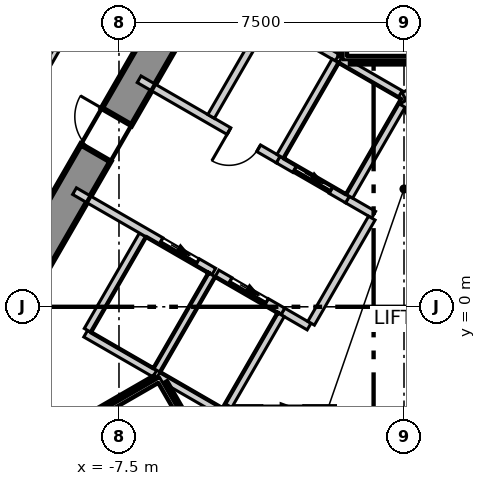
"""IFC4 building model, lengths in metres.
Left out: names, types, materials, properties, quantities, classifications, styles, units other than length and angle.
Written with IfcOpenShell. Run it as: python <this file> out.ifc"""

import sys

from ifc_helpers import new_model, si_unit, direction, frame, frame_2d, origin, place, context, subcontext, project, spatial, polyline, rectangle, outline, extrude, element, fill, save


model = new_model("IFC4")
c1 = context("Model", 3, precision=1e-05, world=origin(), true_north=direction((0.0, 1.0)))
c2 = subcontext(c1, "Body", "Model", "MODEL_VIEW")
j1 = project(units=[si_unit("LENGTHUNIT", "METRE"), si_unit("PLANEANGLEUNIT", "RADIAN")], contexts=[c1])
p1 = place(None, origin())
s1 = spatial("IfcSite", under=j1, at=p1, CompositionType="ELEMENT")
p2 = place(p1, origin())
s2 = spatial("IfcBuilding", under=s1, at=p2, CompositionType="ELEMENT")
p3 = place(p2, frame((0.0, 0.0, 35.3)))
s3 = spatial("IfcBuildingStorey", under=s2, at=p3, CompositionType="ELEMENT", Elevation=35.3)
p4 = place(p3, frame((-1.645, 15.25, -0.3), z_axis=(0.0, 0.0, 1.0), x_axis=(-0.500026485275, -0.866010111964, 0.0)))
e1 = element("IfcWall", 1, at=p4, inside=s3, PredefinedType="SHEAR", context=c2, shape_type="SweptSolid", body=[
    extrude(outline(polyline([(-0.26, -0.45), (1.685, -0.45), (3.63, -0.45), (5.576, -0.45), (7.521, -0.45), (9.466, -0.449), (11.411, -0.449), (13.357, -0.449), (15.302, -0.449), (17.247, -0.449), (19.192, -0.449), (21.138, -0.449), (23.083, -0.449), (25.028, -0.449), (24.509, 0.45), (22.644, 0.45), (20.778, 0.45), (18.913, 0.45), (17.048, 0.45), (15.182, 0.449), (13.317, 0.449), (11.452, 0.449), (9.587, 0.449), (7.721, 0.449), (5.856, 0.449), (3.991, 0.449), (2.125, 0.449), (0.26, 0.449), (-0.26, -0.45)])), origin(), (0.0, 0.0, 1.0), 4.0),
])
p5 = place(p4, frame((11.834, 0.0, 0.3)))
e2 = element("IfcOpeningElement", 2, at=p5, cuts=e1, PredefinedType="OPENING", context=c2, shape_type="SweptSolid", body=[
    extrude(rectangle(XDim=1.1, YDim=2.1, at=frame_2d((0.55, 1.05))), frame((0.0, 0.46, 0.0), z_axis=(0.0, -1.0, 0.0), x_axis=(1.0, 0.0, 0.0)), (0.0, 0.0, 1.0), 0.92),
])
p6 = place(p4, frame((4.842, 0.0, 0.3)))
e3 = element("IfcOpeningElement", 3, at=p6, cuts=e1, PredefinedType="OPENING", context=c2, shape_type="SweptSolid", body=[
    extrude(rectangle(XDim=1.0, YDim=2.1, at=frame_2d((0.5, 1.05))), frame((0.0, 0.46, 0.0), z_axis=(0.0, -1.0, 0.0), x_axis=(1.0, 0.0, 0.0)), (0.0, 0.0, 1.0), 0.92),
])
p7 = place(p3, frame((-3.462, 38.603, 0.0), z_axis=(0.0, 0.0, 1.0), x_axis=(-0.500012207976, -0.866018355391, 0.0)))
e4 = element("IfcWall", 4, at=p7, inside=s3, PredefinedType="ELEMENTEDWALL", context=c2, shape_type="SweptSolid", body=[
    extrude(rectangle(XDim=63.381, YDim=0.2, at=frame_2d((31.69, 0.0))), origin(), (0.0, 0.0, 1.0), 3.7),
])
p8 = place(p7, frame((2.302, 0.0, 0.9)))
e5 = element("IfcOpeningElement", 5, at=p8, cuts=e4, PredefinedType="OPENING", context=c2, shape_type="SweptSolid", body=[
    extrude(rectangle(XDim=5.6, YDim=2.5, at=frame_2d((2.8, 1.25))), frame((0.0, 0.11, 0.0), z_axis=(0.0, -1.0, 0.0), x_axis=(1.0, 0.0, 0.0)), (0.0, 0.0, 1.0), 0.22),
])
p9 = place(p7, frame((9.902, 0.0, 0.9)))
e6 = element("IfcOpeningElement", 6, at=p9, cuts=e4, PredefinedType="OPENING", context=c2, shape_type="SweptSolid", body=[
    extrude(rectangle(XDim=5.6, YDim=2.5, at=frame_2d((2.8, 1.25))), frame((0.0, 0.11, 0.0), z_axis=(0.0, -1.0, 0.0), x_axis=(1.0, 0.0, 0.0)), (0.0, 0.0, 1.0), 0.22),
])
p10 = place(p7, frame((17.501, 0.0, 0.9)))
e7 = element("IfcOpeningElement", 7, at=p10, cuts=e4, PredefinedType="OPENING", context=c2, shape_type="SweptSolid", body=[
    extrude(rectangle(XDim=5.6, YDim=2.5, at=frame_2d((2.8, 1.25))), frame((0.0, 0.11, 0.0), z_axis=(0.0, -1.0, 0.0), x_axis=(1.0, 0.0, 0.0)), (0.0, 0.0, 1.0), 0.22),
])
p11 = place(p7, frame((25.1, 0.0, 0.9)))
e8 = element("IfcOpeningElement", 8, at=p11, cuts=e4, PredefinedType="OPENING", context=c2, shape_type="SweptSolid", body=[
    extrude(rectangle(XDim=5.6, YDim=2.5, at=frame_2d((2.8, 1.25))), frame((0.0, 0.11, 0.0), z_axis=(0.0, -1.0, 0.0), x_axis=(1.0, 0.0, 0.0)), (0.0, 0.0, 1.0), 0.22),
])
p12 = place(p7, frame((32.7, 0.0, 0.9)))
e9 = element("IfcOpeningElement", 9, at=p12, cuts=e4, PredefinedType="OPENING", context=c2, shape_type="SweptSolid", body=[
    extrude(rectangle(XDim=5.6, YDim=2.5, at=frame_2d((2.8, 1.25))), frame((0.0, 0.11, 0.0), z_axis=(0.0, -1.0, 0.0), x_axis=(1.0, 0.0, 0.0)), (0.0, 0.0, 1.0), 0.22),
])
p13 = place(p7, frame((40.299, 0.0, 0.9)))
e10 = element("IfcOpeningElement", 10, at=p13, cuts=e4, PredefinedType="OPENING", context=c2, shape_type="SweptSolid", body=[
    extrude(rectangle(XDim=5.6, YDim=2.5, at=frame_2d((2.8, 1.25))), frame((0.0, 0.11, 0.0), z_axis=(0.0, -1.0, 0.0), x_axis=(1.0, 0.0, 0.0)), (0.0, 0.0, 1.0), 0.22),
])
p14 = place(p7, frame((47.899, 0.0, 0.9)))
e11 = element("IfcOpeningElement", 11, at=p14, cuts=e4, PredefinedType="OPENING", context=c2, shape_type="SweptSolid", body=[
    extrude(rectangle(XDim=5.6, YDim=2.5, at=frame_2d((2.8, 1.25))), frame((0.0, 0.11, 0.0), z_axis=(0.0, -1.0, 0.0), x_axis=(1.0, 0.0, 0.0)), (0.0, 0.0, 1.0), 0.22),
])
p15 = place(p7, frame((55.498, 0.0, 0.9)))
e12 = element("IfcOpeningElement", 12, at=p15, cuts=e4, PredefinedType="OPENING", context=c2, shape_type="SweptSolid", body=[
    extrude(rectangle(XDim=5.6, YDim=2.5, at=frame_2d((2.8, 1.25))), frame((0.0, 0.11, 0.0), z_axis=(0.0, -1.0, 0.0), x_axis=(1.0, 0.0, 0.0)), (0.0, 0.0, 1.0), 0.22),
])
p16 = place(p3, frame((-19.497, -11.17, 0.0), z_axis=(0.0, 0.0, 1.0), x_axis=(0.499998854553, 0.866026065108, 0.0)))
e13 = element("IfcWall", 13, at=p16, inside=s3, PredefinedType="PARTITIONING", context=c2, shape_type="SweptSolid", body=[
    extrude(rectangle(XDim=38.994, YDim=0.15, at=frame_2d((19.497, 0.0))), origin(), (0.0, 0.0, 1.0), 3.7),
])
p17 = place(p16, frame((36.244, 0.0, 0.0)))
e14 = element("IfcOpeningElement", 14, at=p17, cuts=e13, PredefinedType="OPENING", context=c2, shape_type="SweptSolid", body=[
    extrude(rectangle(XDim=1.1, YDim=2.1, at=frame_2d((0.55, 1.05))), frame((0.0, 0.085, 0.0), z_axis=(0.0, -1.0, 0.0), x_axis=(1.0, 0.0, 0.0)), (0.0, 0.0, 1.0), 0.17),
])
p18 = place(p16, frame((29.171, 0.0, 0.0)))
e15 = element("IfcOpeningElement", 15, at=p18, cuts=e13, PredefinedType="OPENING", context=c2, shape_type="SweptSolid", body=[
    extrude(rectangle(XDim=1.0, YDim=2.1, at=frame_2d((0.5, 1.05))), frame((0.0, 0.085, 0.0), z_axis=(0.0, -1.0, 0.0), x_axis=(1.0, 0.0, 0.0)), (0.0, 0.0, 1.0), 0.17),
])
p19 = place(p16, frame((32.971, 0.0, 0.0)))
e16 = element("IfcOpeningElement", 16, at=p19, cuts=e13, PredefinedType="OPENING", context=c2, shape_type="SweptSolid", body=[
    extrude(rectangle(XDim=0.9, YDim=2.1, at=frame_2d((0.45, 1.05))), frame((0.0, 0.085, 0.0), z_axis=(0.0, -1.0, 0.0), x_axis=(1.0, 0.0, 0.0)), (0.0, 0.0, 1.0), 0.17),
])
p20 = place(p16, frame((22.771, 0.0, 0.0)))
e17 = element("IfcOpeningElement", 17, at=p20, cuts=e13, PredefinedType="OPENING", context=c2, shape_type="SweptSolid", body=[
    extrude(rectangle(XDim=1.0, YDim=2.1, at=frame_2d((0.5, 1.05))), frame((0.0, 0.085, 0.0), z_axis=(0.0, -1.0, 0.0), x_axis=(1.0, 0.0, 0.0)), (0.0, 0.0, 1.0), 0.17),
])
p21 = place(p16, frame((6.872, 0.0, 0.0)))
e18 = element("IfcOpeningElement", 18, at=p21, cuts=e13, PredefinedType="OPENING", context=c2, shape_type="SweptSolid", body=[
    extrude(rectangle(XDim=1.1, YDim=2.1, at=frame_2d((0.55, 1.05))), frame((0.0, 0.085, 0.0), z_axis=(0.0, -1.0, 0.0), x_axis=(1.0, 0.0, 0.0)), (0.0, 0.0, 1.0), 0.17),
])
p22 = place(p16, frame((17.372, 0.0, 0.0)))
e19 = element("IfcOpeningElement", 19, at=p22, cuts=e13, PredefinedType="OPENING", context=c2, shape_type="SweptSolid", body=[
    extrude(rectangle(XDim=0.9, YDim=2.1, at=frame_2d((0.45, 1.05))), frame((0.0, 0.085, 0.0), z_axis=(0.0, -1.0, 0.0), x_axis=(1.0, 0.0, 0.0)), (0.0, 0.0, 1.0), 0.17),
])
p23 = place(p16, frame((14.172, 0.0, 0.0)))
e20 = element("IfcOpeningElement", 20, at=p23, cuts=e13, PredefinedType="OPENING", context=c2, shape_type="SweptSolid", body=[
    extrude(rectangle(XDim=0.9, YDim=2.1, at=frame_2d((0.45, 1.05))), frame((0.0, 0.085, 0.0), z_axis=(0.0, -1.0, 0.0), x_axis=(1.0, 0.0, 0.0)), (0.0, 0.0, 1.0), 0.17),
])
p24 = place(p16, frame((11.272, 0.0, 0.0)))
e21 = element("IfcOpeningElement", 21, at=p24, cuts=e13, PredefinedType="OPENING", context=c2, shape_type="SweptSolid", body=[
    extrude(rectangle(XDim=1.0, YDim=2.1, at=frame_2d((0.5, 1.05))), frame((0.0, 0.085, 0.0), z_axis=(0.0, -1.0, 0.0), x_axis=(1.0, 0.0, 0.0)), (0.0, 0.0, 1.0), 0.17),
])
p25 = place(p16, frame((1.473, 0.0, 0.0)))
e22 = element("IfcOpeningElement", 22, at=p25, cuts=e13, PredefinedType="OPENING", context=c2, shape_type="SweptSolid", body=[
    extrude(rectangle(XDim=1.1, YDim=2.1, at=frame_2d((0.55, 1.05))), frame((0.0, 0.085, 0.0), z_axis=(0.0, -1.0, 0.0), x_axis=(1.0, 0.0, 0.0)), (0.0, 0.0, 1.0), 0.17),
])
p26 = place(p3, frame((0.075, 22.47, 0.0), z_axis=(0.0, 0.0, 1.0), x_axis=(0.500002280369, -0.866024087209, 0.0)))
e23 = element("IfcWall", 23, at=p26, inside=s3, PredefinedType="PARTITIONING", context=c2, shape_type="SweptSolid", body=[
    extrude(rectangle(XDim=38.844, YDim=0.15, at=frame_2d((19.422, 0.0))), origin(), (0.0, 0.0, 1.0), 3.7),
])
p27 = place(p26, frame((36.244, 0.0, 0.0)))
e24 = element("IfcOpeningElement", 24, at=p27, cuts=e23, PredefinedType="OPENING", context=c2, shape_type="SweptSolid", body=[
    extrude(rectangle(XDim=1.1, YDim=2.1, at=frame_2d((0.55, 1.05))), frame((0.0, 0.085, 0.0), z_axis=(0.0, -1.0, 0.0), x_axis=(1.0, 0.0, 0.0)), (0.0, 0.0, 1.0), 0.17),
])
p28 = place(p26, frame((26.472, 0.0, 0.0)))
e25 = element("IfcOpeningElement", 25, at=p28, cuts=e23, PredefinedType="OPENING", context=c2, shape_type="SweptSolid", body=[
    extrude(rectangle(XDim=1.1, YDim=2.1, at=frame_2d((0.55, 1.05))), frame((0.0, 0.085, 0.0), z_axis=(0.0, -1.0, 0.0), x_axis=(1.0, 0.0, 0.0)), (0.0, 0.0, 1.0), 0.17),
])
p29 = place(p26, frame((8.872, 0.0, 0.0)))
e26 = element("IfcOpeningElement", 26, at=p29, cuts=e23, PredefinedType="OPENING", context=c2, shape_type="SweptSolid", body=[
    extrude(rectangle(XDim=1.1, YDim=2.1, at=frame_2d((0.55, 1.05))), frame((0.0, 0.085, 0.0), z_axis=(0.0, -1.0, 0.0), x_axis=(1.0, 0.0, 0.0)), (0.0, 0.0, 1.0), 0.17),
])
p30 = place(p26, frame((17.672, 0.0, 0.0)))
e27 = element("IfcOpeningElement", 27, at=p30, cuts=e23, PredefinedType="OPENING", context=c2, shape_type="SweptSolid", body=[
    extrude(rectangle(XDim=0.9, YDim=2.1, at=frame_2d((0.45, 1.05))), frame((0.0, 0.085, 0.0), z_axis=(0.0, -1.0, 0.0), x_axis=(1.0, 0.0, 0.0)), (0.0, 0.0, 1.0), 0.17),
])
p31 = place(p26, frame((15.272, 0.0, 0.0)))
e28 = element("IfcOpeningElement", 28, at=p31, cuts=e23, PredefinedType="OPENING", context=c2, shape_type="SweptSolid", body=[
    extrude(rectangle(XDim=0.9, YDim=2.1, at=frame_2d((0.45, 1.05))), frame((0.0, 0.085, 0.0), z_axis=(0.0, -1.0, 0.0), x_axis=(1.0, 0.0, 0.0)), (0.0, 0.0, 1.0), 0.17),
])
p32 = place(p26, frame((1.473, 0.0, 0.0)))
e29 = element("IfcOpeningElement", 29, at=p32, cuts=e23, PredefinedType="OPENING", context=c2, shape_type="SweptSolid", body=[
    extrude(rectangle(XDim=1.1, YDim=2.1, at=frame_2d((0.55, 1.05))), frame((0.0, 0.085, 0.0), z_axis=(0.0, -1.0, 0.0), x_axis=(1.0, 0.0, 0.0)), (0.0, 0.0, 1.0), 0.17),
])
p33 = place(p3, frame((-8.376, -0.707, 0.0), z_axis=(0.0, 0.0, 1.0), x_axis=(0.866067520717, -0.499927044236, 0.0)))
e30 = element("IfcWall", 30, at=p33, inside=s3, PredefinedType="SOLIDWALL", context=c2, shape_type="SweptSolid", body=[
    extrude(rectangle(XDim=2.1, YDim=0.2, at=frame_2d((1.05, 0.0))), origin(), (0.0, 0.0, 1.0), 3.7),
])
p34 = place(p3, frame((-8.326, -0.62, 0.0), z_axis=(0.0, 0.0, 1.0), x_axis=(0.500023687443, 0.866011727401, 0.0)))
e31 = element("IfcWall", 31, at=p34, inside=s3, PredefinedType="SOLIDWALL", context=c2, shape_type="SweptSolid", body=[
    extrude(rectangle(XDim=2.9, YDim=0.2, at=frame_2d((1.45, 0.0))), origin(), (0.0, 0.0, 1.0), 3.7),
])
p35 = place(p3, frame((-4.676, -2.7, 0.0), z_axis=(0.0, 0.0, 1.0), x_axis=(1.0, 0.0, 0.0)))
e32 = element("IfcWall", 32, at=p35, inside=s3, PredefinedType="SOLIDWALL", context=c2, shape_type="SweptSolid", body=[
    extrude(rectangle(XDim=2.873, YDim=0.2, at=frame_2d((1.437, 0.0))), origin(), (0.0, 0.0, 1.0), 3.7),
])
p36 = place(p35, frame((0.937, 0.0, 0.0)))
e33 = element("IfcOpeningElement", 33, at=p36, cuts=e32, PredefinedType="OPENING", context=c2, shape_type="SweptSolid", body=[
    extrude(rectangle(XDim=1.1, YDim=2.1, at=frame_2d((0.55, 1.05))), frame((0.0, 0.11, 0.0), z_axis=(0.0, -1.0, 0.0), x_axis=(1.0, 0.0, 0.0)), (0.0, 0.0, 1.0), 0.22),
])
p37 = place(p3, frame((-0.002, 5.541, 0.0), z_axis=(0.0, 0.0, 1.0), x_axis=(0.86600155993, 0.500041296494, 0.0)))
e34 = element("IfcWall", 34, at=p37, inside=s3, PredefinedType="SOLIDWALL", context=c2, shape_type="SweptSolid", body=[
    extrude(rectangle(XDim=4.132, YDim=0.2, at=frame_2d((2.066, 0.0))), origin(), (0.0, 0.0, 1.0), 3.7),
])
p38 = place(p3, frame((0.0, 5.4, 0.0), z_axis=(0.0, 0.0, 1.0), x_axis=(0.500103862429, -0.865965430478, 0.0)))
e35 = element("IfcWall", 35, at=p38, inside=s3, PredefinedType="SOLIDWALL", context=c2, shape_type="SweptSolid", body=[
    extrude(rectangle(XDim=2.973, YDim=0.2, at=frame_2d((1.487, 0.0))), origin(), (0.0, 0.0, 1.0), 3.7),
])
p39 = place(p38, frame((0.937, 0.0, 0.0)))
e36 = element("IfcOpeningElement", 36, at=p39, cuts=e35, PredefinedType="OPENING", context=c2, shape_type="SweptSolid", body=[
    extrude(rectangle(XDim=1.1, YDim=2.1, at=frame_2d((0.55, 1.05))), frame((0.0, 0.11, 0.0), z_axis=(0.0, -1.0, 0.0), x_axis=(1.0, 0.0, 0.0)), (0.0, 0.0, 1.0), 0.22),
])
p40 = place(p3, frame((-8.67, 3.043, 0.0), z_axis=(0.0, 0.0, 1.0), x_axis=(0.866029956157, -0.499992114976, 0.0)))
e37 = element("IfcWall", 37, at=p40, inside=s3, PredefinedType="SOLIDWALL", context=c2, shape_type="SweptSolid", body=[
    extrude(rectangle(XDim=4.232, YDim=0.2, at=frame_2d((2.116, 0.0))), origin(), (0.0, 0.0, 1.0), 3.7),
])
p41 = place(p40, frame((2.63, 0.0, 0.0)))
e38 = element("IfcOpeningElement", 38, at=p41, cuts=e37, PredefinedType="OPENING", context=c2, shape_type="SweptSolid", body=[
    extrude(rectangle(XDim=1.1, YDim=2.1, at=frame_2d((0.55, 1.05))), frame((0.0, 0.11, 0.0), z_axis=(0.0, -1.0, 0.0), x_axis=(1.0, 0.0, 0.0)), (0.0, 0.0, 1.0), 0.22),
])
p42 = place(p3, frame((-3.188, -0.122, 0.0), z_axis=(0.0, 0.0, 1.0), x_axis=(0.865705793592, -0.50055317294, 0.0)))
e39 = element("IfcWall", 39, at=p42, inside=s3, PredefinedType="SOLIDWALL", context=c2, shape_type="SweptSolid", body=[
    extrude(rectangle(XDim=0.797, YDim=0.2, at=frame_2d((0.398, 0.0))), origin(), (0.0, 0.0, 1.0), 3.7),
])
p43 = place(p3, frame((-6.97, 5.987, 0.0), z_axis=(0.0, 0.0, 1.0), x_axis=(0.866029956157, -0.499992114976, 0.0)))
e40 = element("IfcWall", 40, at=p43, inside=s3, PredefinedType="SOLIDWALL", context=c2, shape_type="SweptSolid", body=[
    extrude(rectangle(XDim=4.232, YDim=0.2, at=frame_2d((2.116, 0.0))), origin(), (0.0, 0.0, 1.0), 3.7),
])
p44 = place(p43, frame((2.73, 0.0, 0.0)))
e41 = element("IfcOpeningElement", 41, at=p44, cuts=e40, PredefinedType="OPENING", context=c2, shape_type="SweptSolid", body=[
    extrude(rectangle(XDim=0.9, YDim=2.1, at=frame_2d((0.45, 1.05))), frame((0.0, 0.11, 0.0), z_axis=(0.0, -1.0, 0.0), x_axis=(1.0, 0.0, 0.0)), (0.0, 0.0, 1.0), 0.22),
])
p45 = place(p3, frame((-1.488, 2.822, 0.0), z_axis=(0.0, 0.0, 1.0), x_axis=(0.866236612152, -0.499633997809, 0.0)))
e42 = element("IfcWall", 42, at=p45, inside=s3, PredefinedType="SOLIDWALL", context=c2, shape_type="SweptSolid", body=[
    extrude(rectangle(XDim=0.796, YDim=0.2, at=frame_2d((0.398, 0.0))), origin(), (0.0, 0.0, 1.0), 3.7),
])
p46 = place(p3, frame((-5.076, 5.009, 0.0), z_axis=(0.0, 0.0, 1.0), x_axis=(0.50002537861, 0.866010750942, 0.0)))
e43 = element("IfcWall", 43, at=p46, inside=s3, PredefinedType="SOLIDWALL", context=c2, shape_type="SweptSolid", body=[
    extrude(rectangle(XDim=3.0, YDim=0.2, at=frame_2d((1.5, 0.0))), origin(), (0.0, 0.0, 1.0), 3.7),
])
p47 = place(p3, frame((-3.489, 7.557, 0.0), z_axis=(0.0, 0.0, 1.0), x_axis=(0.866010750942, -0.50002537861, 0.0)))
e44 = element("IfcWall", 44, at=p47, inside=s3, PredefinedType="SOLIDWALL", context=c2, shape_type="SweptSolid", body=[
    extrude(rectangle(XDim=2.0, YDim=0.2, at=frame_2d((1.0, 0.0))), origin(), (0.0, 0.0, 1.0), 3.7),
])
p48 = place(p3, frame((-2.444, -0.433, 0.0), z_axis=(0.0, 0.0, 1.0), x_axis=(0.500035624827, 0.866004834804, 0.0)))
e45 = element("IfcWall", 45, at=p48, inside=s3, PredefinedType="SOLIDWALL", context=c2, shape_type="SweptSolid", body=[
    extrude(rectangle(XDim=3.194, YDim=0.2, at=frame_2d((1.597, 0.0))), origin(), (0.0, 0.0, 1.0), 3.7),
])
p49 = place(p3, frame((-6.507, -1.67, 0.0), z_axis=(0.0, 0.0, 1.0), x_axis=(0.50012328804, 0.865954211699, 0.0)))
e46 = element("IfcWall", 46, at=p49, inside=s3, PredefinedType="SOLIDWALL", context=c2, shape_type="SweptSolid", body=[
    extrude(rectangle(XDim=2.9, YDim=0.2, at=frame_2d((1.45, 0.0))), origin(), (0.0, 0.0, 1.0), 3.7),
])
p50 = place(p3, frame((-6.47, -1.807, 0.0), z_axis=(0.0, 0.0, 1.0), x_axis=(0.865883195159, -0.500246231712, 0.0)))
e47 = element("IfcWall", 47, at=p50, inside=s3, PredefinedType="SOLIDWALL", context=c2, shape_type="SweptSolid", body=[
    extrude(rectangle(XDim=1.815, YDim=0.2, at=frame_2d((0.908, 0.0))), origin(), (0.0, 0.0, 1.0), 3.7),
])
p51 = place(p3, frame((-4.922, 0.879, 0.0), z_axis=(0.0, 0.0, 1.0), x_axis=(0.866073918653, -0.499915960366, 0.0)))
e48 = element("IfcWall", 48, at=p51, inside=s3, PredefinedType="SOLIDWALL", context=c2, shape_type="SweptSolid", body=[
    extrude(rectangle(XDim=2.002, YDim=0.2, at=frame_2d((1.001, 0.0))), origin(), (0.0, 0.0, 1.0), 3.7),
])
p52 = place(p51, frame((0.402, 0.0, 0.0)))
e49 = element("IfcOpeningElement", 49, at=p52, cuts=e48, PredefinedType="OPENING", context=c2, shape_type="SweptSolid", body=[
    extrude(rectangle(XDim=1.1, YDim=2.1, at=frame_2d((0.55, 1.05))), frame((0.0, 0.11, 0.0), z_axis=(0.0, -1.0, 0.0), x_axis=(1.0, 0.0, 0.0)), (0.0, 0.0, 1.0), 0.22),
])
p53 = place(p3, frame((-4.619, -2.6, 0.0), z_axis=(0.0, 0.0, 1.0), x_axis=(0.50009492287, 0.865970593103, 0.0)))
e50 = element("IfcWall", 50, at=p53, inside=s3, PredefinedType="SOLIDWALL", context=c2, shape_type="SweptSolid", body=[
    extrude(rectangle(XDim=2.761, YDim=0.2, at=frame_2d((1.381, 0.0))), origin(), (0.0, 0.0, 1.0), 3.7),
])
p54 = place(p3, frame((-3.309, 3.873, 0.0), z_axis=(0.0, 0.0, 1.0), x_axis=(0.866098583652, -0.499873227325, 0.0)))
e51 = element("IfcWall", 51, at=p54, inside=s3, PredefinedType="SOLIDWALL", context=c2, shape_type="SweptSolid", body=[
    extrude(rectangle(XDim=2.103, YDim=0.2, at=frame_2d((1.051, 0.0))), origin(), (0.0, 0.0, 1.0), 3.7),
])
p55 = place(p54, frame((0.502, 0.0, 0.0)))
e52 = element("IfcOpeningElement", 52, at=p55, cuts=e51, PredefinedType="OPENING", context=c2, shape_type="SweptSolid", body=[
    extrude(rectangle(XDim=1.1, YDim=2.1, at=frame_2d((0.55, 1.05))), frame((0.0, 0.11, 0.0), z_axis=(0.0, -1.0, 0.0), x_axis=(1.0, 0.0, 0.0)), (0.0, 0.0, 1.0), 0.22),
])
p56 = place(p3, frame((-3.257, 3.959, 0.0), z_axis=(0.0, 0.0, 1.0), x_axis=(0.50012328804, 0.865954211699, 0.0)))
e53 = element("IfcWall", 53, at=p56, inside=s3, PredefinedType="SOLIDWALL", context=c2, shape_type="SweptSolid", body=[
    extrude(rectangle(XDim=2.9, YDim=0.2, at=frame_2d((1.45, 0.0))), origin(), (0.0, 0.0, 1.0), 3.7),
])
p57 = place(p3, frame((-1.67, 6.507, 0.0), z_axis=(0.0, 0.0, 1.0), x_axis=(0.865941441609, -0.500145398563, 0.0)))
e54 = element("IfcWall", 54, at=p57, inside=s3, PredefinedType="SOLIDWALL", context=c2, shape_type="SweptSolid", body=[
    extrude(rectangle(XDim=1.815, YDim=0.2, at=frame_2d((0.908, 0.0))), origin(), (0.0, 0.0, 1.0), 3.7),
])
p58 = place(p3, frame((-1.438, 2.909, 0.0), z_axis=(0.0, 0.0, 1.0), x_axis=(0.499829630636, 0.866123744241, 0.0)))
e55 = element("IfcWall", 55, at=p58, inside=s3, PredefinedType="SOLIDWALL", context=c2, shape_type="SweptSolid", body=[
    extrude(rectangle(XDim=2.761, YDim=0.2, at=frame_2d((1.38, 0.0))), origin(), (0.0, 0.0, 1.0), 3.7),
])
p59 = place(p3, frame((-13.99, -6.229, 0.0), z_axis=(0.0, 0.0, 1.0), x_axis=(0.866060059011, 0.499939970583, 0.0)))
e56 = element("IfcWall", 56, at=p59, inside=s3, PredefinedType="SOLIDWALL", context=c2, shape_type="SweptSolid", body=[
    extrude(rectangle(XDim=8.615, YDim=0.2, at=frame_2d((4.307, 0.0))), origin(), (0.0, 0.0, 1.0), 3.7),
])
p60 = place(p3, frame((-6.329, -2.038, 0.0), z_axis=(0.0, 0.0, 1.0), x_axis=(0.500200581029, -0.865909567298, 0.0)))
e57 = element("IfcWall", 57, at=p60, inside=s3, PredefinedType="SOLIDWALL", context=c2, shape_type="SweptSolid", body=[
    extrude(rectangle(XDim=2.799, YDim=0.2, at=frame_2d((1.399, 0.0))), origin(), (0.0, 0.0, 1.0), 3.7),
])
p61 = place(p3, frame((-1.4, 6.5, 0.0), z_axis=(0.0, 0.0, 1.0), x_axis=(1.0, 0.0, 0.0)))
e58 = element("IfcWall", 58, at=p61, inside=s3, PredefinedType="SOLIDWALL", context=c2, shape_type="SweptSolid", body=[
    extrude(rectangle(XDim=2.8, YDim=0.2, at=frame_2d((1.4, 0.0))), origin(), (0.0, 0.0, 1.0), 3.7),
])
p62 = place(p3, frame((-1.6, 6.615, 0.0), z_axis=(0.0, 0.0, 1.0), x_axis=(0.0, 1.0, 0.0)))
e59 = element("IfcWall", 59, at=p62, inside=s3, PredefinedType="SOLIDWALL", context=c2, shape_type="SweptSolid", body=[
    extrude(rectangle(XDim=8.615, YDim=0.2, at=frame_2d((4.308, 0.0))), origin(), (0.0, 0.0, 1.0), 3.7),
])
p63 = place(p52, origin())
e60 = element("IfcDoor", 60, at=p63, inside=s3, OperationType="SLIDING_TO_LEFT", PredefinedType="DOOR", context=c2, shape_type="SweptSolid", body=[
    extrude(rectangle(XDim=1.1, YDim=2.1, at=frame_2d((0.55, 1.05))), frame((0.0, 0.025, 0.0), z_axis=(0.0, -1.0, 0.0), x_axis=(1.0, 0.0, 0.0)), (0.0, 0.0, 1.0), 0.05),
])
fill(e49, e60)
p64 = place(p55, origin())
e61 = element("IfcDoor", 61, at=p64, inside=s3, OperationType="SLIDING_TO_LEFT", PredefinedType="DOOR", context=c2, shape_type="SweptSolid", body=[
    extrude(rectangle(XDim=1.1, YDim=2.1, at=frame_2d((0.55, 1.05))), frame((0.0, 0.025, 0.0), z_axis=(0.0, -1.0, 0.0), x_axis=(1.0, 0.0, 0.0)), (0.0, 0.0, 1.0), 0.05),
])
fill(e52, e61)
p65 = place(p41, origin())
e62 = element("IfcDoor", 62, at=p65, inside=s3, OperationType="SLIDING_TO_LEFT", PredefinedType="DOOR", context=c2, shape_type="SweptSolid", body=[
    extrude(rectangle(XDim=1.1, YDim=2.1, at=frame_2d((0.55, 1.05))), frame((0.0, 0.025, 0.0), z_axis=(0.0, -1.0, 0.0), x_axis=(1.0, 0.0, 0.0)), (0.0, 0.0, 1.0), 0.05),
])
fill(e38, e62)
p66 = place(p44, origin())
e63 = element("IfcDoor", 63, at=p66, inside=s3, OperationType="SINGLE_SWING_LEFT", PredefinedType="DOOR", context=c2, shape_type="SweptSolid", body=[
    extrude(rectangle(XDim=0.9, YDim=2.1, at=frame_2d((0.45, 1.05))), frame((0.0, 0.025, 0.0), z_axis=(0.0, -1.0, 0.0), x_axis=(1.0, 0.0, 0.0)), (0.0, 0.0, 1.0), 0.05),
])
fill(e41, e63)
p67 = place(p5, origin())
e64 = element("IfcDoor", 64, at=p67, inside=s3, OperationType="SINGLE_SWING_LEFT", PredefinedType="DOOR", context=c2, shape_type="SweptSolid", body=[
    extrude(rectangle(XDim=1.1, YDim=2.1, at=frame_2d((0.55, 1.05))), frame((0.0, 0.025, 0.0), z_axis=(0.0, -1.0, 0.0), x_axis=(1.0, 0.0, 0.0)), (0.0, 0.0, 1.0), 0.05),
])
fill(e2, e64)
save(model, sys.argv[1])
